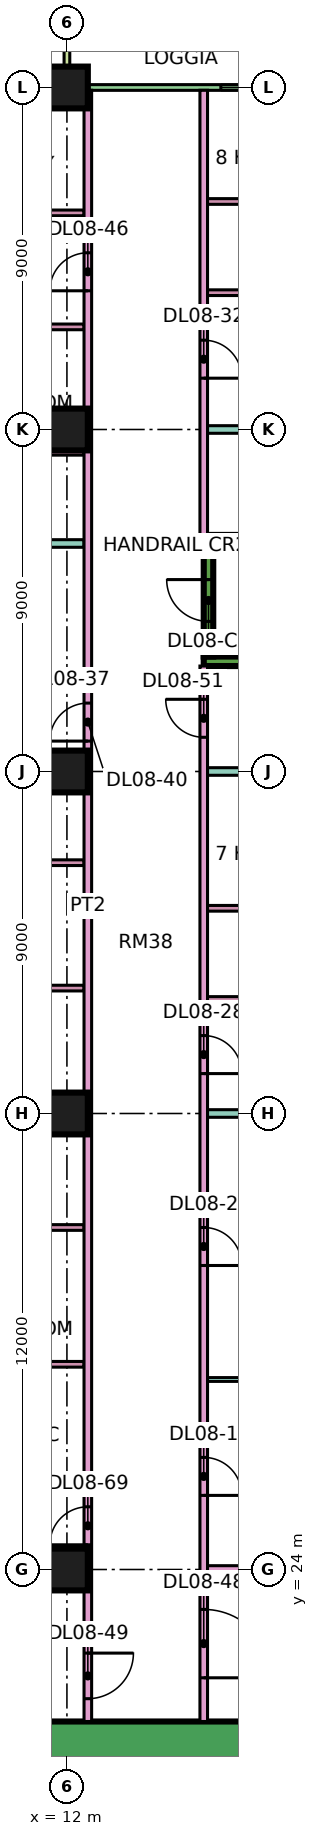
"""IFC4 building model, lengths in metres.
Left out: names, types, materials, properties, quantities, classifications, styles, units other than length and angle.
Written with IfcOpenShell. Run it as: python <this file> out.ifc"""

import sys

from ifc_helpers import new_model, si_unit, direction, frame, frame_2d, origin, origin_2d, place, context, subcontext, project, spatial, rectangle, extrude, element, fill, save


model = new_model("IFC4")
c1 = context("Model", 3, precision=1e-05, world=origin(), true_north=direction((0.0, 1.0)))
c2 = subcontext(c1, "Body", "Model", "MODEL_VIEW")
j1 = project(units=[si_unit("LENGTHUNIT", "METRE"), si_unit("PLANEANGLEUNIT", "RADIAN")], contexts=[c1])
p1 = place(None, origin())
s1 = spatial("IfcSite", under=j1, at=p1, CompositionType="ELEMENT")
p2 = place(p1, origin())
s2 = spatial("IfcBuilding", under=s1, at=p2, CompositionType="ELEMENT")
p3 = place(p2, frame((0.0, 0.0, 45.15)))
s3 = spatial("IfcBuildingStorey", under=s2, at=p3, CompositionType="ELEMENT", Elevation=45.15)
for number, where, z_axis, x_axis in (
    (1, (12.0, 24.0, 0.0), (0.0, 0.0, 1.0), (1.0, 0.0, 0.0)),
    (2, (12.0, 36.0, 0.0), (0.0, 0.0, 1.0), (1.0, 0.0, 0.0)),
    (3, (12.0, 45.0, 0.0), (0.0, 0.0, 1.0), (1.0, 0.0, 0.0)),
    (4, (12.0, 54.0, 0.0), (0.0, 0.0, 1.0), (1.0, 0.0, 0.0)),
    (5, (12.0, 63.0, 0.0), (0.0, 0.0, 1.0), (1.0, 0.0, 0.0)),
):
    element("IfcColumn", number, at=place(p3, frame(where, z_axis=z_axis, x_axis=x_axis)), inside=s3, PredefinedType="COLUMN", context=c2, shape_type="SweptSolid", body=[
        extrude(rectangle(XDim=1.1, YDim=1.1, at=origin_2d()), origin(), (0.0, 0.0, 1.0), 3.75),
    ])
p4 = place(p3, frame((9.0, 19.45, 0.0), z_axis=(0.0, 0.0, 1.0), x_axis=(1.0, 0.0, 0.0)))
e6 = element("IfcWall", 6, at=p4, inside=s3, PredefinedType="SHEAR", context=c2, shape_type="SweptSolid", body=[
    extrude(rectangle(XDim=25.0, YDim=1.1, at=frame_2d((12.5, 0.0))), origin(), (0.0, 0.0, 1.0), 3.75),
])
p5 = place(p4, frame((19.1, 0.0, 0.0)))
e7 = element("IfcOpeningElement", 7, at=p5, cuts=e6, PredefinedType="OPENING", context=c2, shape_type="SweptSolid", body=[
    extrude(rectangle(XDim=1.8, YDim=2.4, at=frame_2d((0.9, 1.2))), frame((0.0, 0.56, 0.0), z_axis=(0.0, -1.0, 0.0), x_axis=(1.0, 0.0, 0.0)), (0.0, 0.0, 1.0), 1.12),
])
for number, where, z_axis, x_axis in (
    (8, (15.6, 47.9, 0.0), (0.0, 0.0, 1.0), (1.0, 0.0, 0.0)),
    (9, (15.6, 51.1, 0.0), (0.0, 0.0, 1.0), (1.0, 0.0, 0.0)),
):
    element("IfcWall", number, at=place(p3, frame(where, z_axis=z_axis, x_axis=x_axis)), inside=s3, PredefinedType="SHEAR", context=c2, shape_type="SweptSolid", body=[
        extrude(rectangle(XDim=7.0, YDim=0.25, at=frame_2d((3.5, 0.0))), origin(), (0.0, 0.0, 1.0), 3.75),
    ])
p6 = place(p3, frame((15.725, 48.025, 0.0), z_axis=(0.0, 0.0, 1.0), x_axis=(0.0, 1.0, 0.0)))
e10 = element("IfcWall", 10, at=p6, inside=s3, PredefinedType="SHEAR", context=c2, shape_type="SweptSolid", body=[
    extrude(rectangle(XDim=2.95, YDim=0.25, at=frame_2d((1.475, 0.0))), origin(), (0.0, 0.0, 1.0), 3.75),
])
p7 = place(p6, frame((0.925, 0.0, 0.0)))
e11 = element("IfcOpeningElement", 11, at=p7, cuts=e10, PredefinedType="OPENING", context=c2, shape_type="SweptSolid", body=[
    extrude(rectangle(XDim=1.1, YDim=2.2, at=frame_2d((0.55, 1.1))), frame((0.0, 0.135, 0.0), z_axis=(0.0, -1.0, 0.0), x_axis=(1.0, 0.0, 0.0)), (0.0, 0.0, 1.0), 0.27),
])
p8 = place(p3, frame((22.425, 63.0, 0.0), z_axis=(0.0, 0.0, 1.0), x_axis=(-1.0, 0.0, 0.0)))
e12 = element("IfcWall", 12, at=p8, inside=s3, PredefinedType="SOLIDWALL", context=c2, shape_type="SweptSolid", body=[
    extrude(rectangle(XDim=10.35, YDim=0.15, at=frame_2d((5.175, 0.0))), origin(), (0.0, 0.0, 1.0), 3.35),
])
p9 = place(p8, frame((0.562, 0.0, 0.45)))
e13 = element("IfcOpeningElement", 13, at=p9, cuts=e12, PredefinedType="OPENING", context=c2, shape_type="SweptSolid", body=[
    extrude(rectangle(XDim=1.2, YDim=2.4, at=frame_2d((0.6, 1.2))), frame((0.0, 0.085, 0.0), z_axis=(0.0, -1.0, 0.0), x_axis=(1.0, 0.0, 0.0)), (0.0, 0.0, 1.0), 0.17),
])
p10 = place(p8, frame((3.975, 0.0, 0.45)))
e14 = element("IfcOpeningElement", 14, at=p10, cuts=e12, PredefinedType="OPENING", context=c2, shape_type="SweptSolid", body=[
    extrude(rectangle(XDim=2.4, YDim=2.4, at=frame_2d((1.2, 1.2))), frame((0.0, 0.085, 0.0), z_axis=(0.0, -1.0, 0.0), x_axis=(1.0, 0.0, 0.0)), (0.0, 0.0, 1.0), 0.17),
])
p11 = place(p3, frame((12.0, 64.5, 0.0), z_axis=(0.0, 0.0, 1.0), x_axis=(0.0, -1.0, 0.0)))
e15 = element("IfcWall", 15, at=p11, inside=s3, PredefinedType="SOLIDWALL", context=c2, shape_type="SweptSolid", body=[
    extrude(rectangle(XDim=1.5, YDim=0.15, at=frame_2d((0.75, 0.0))), origin(), (0.0, 0.0, 1.0), 3.35),
])
p12 = place(p3, frame((0.0, 36.0, 0.0), z_axis=(0.0, 0.0, 1.0), x_axis=(1.0, 0.0, 0.0)))
e16 = element("IfcWall", 16, at=p12, inside=s3, PredefinedType="PARTITIONING", context=c2, shape_type="SweptSolid", body=[
    extrude(rectangle(XDim=12.45, YDim=0.2, at=frame_2d((6.225, 0.0))), origin(), (0.0, 0.0, 1.0), 3.35),
])
p13 = place(p3, frame((-1.35, 51.0, 0.0), z_axis=(0.0, 0.0, 1.0), x_axis=(1.0, 0.0, 0.0)))
e17 = element("IfcWall", 17, at=p13, inside=s3, PredefinedType="PARTITIONING", context=c2, shape_type="SweptSolid", body=[
    extrude(rectangle(XDim=13.8, YDim=0.2, at=frame_2d((6.9, 0.0))), origin(), (0.0, 0.0, 1.0), 3.35),
])
p14 = place(p3, frame((0.074, 22.4, 0.0), z_axis=(0.0, 0.0, 1.0), x_axis=(1.0, 0.0, 0.0)))
e18 = element("IfcWall", 18, at=p14, inside=s3, PredefinedType="PARTITIONING", context=c2, shape_type="SweptSolid", body=[
    extrude(rectangle(XDim=12.376, YDim=0.2, at=frame_2d((6.188, 0.0))), origin(), (0.0, 0.0, 1.0), 3.35),
])
p15 = place(p3, frame((7.1, 47.4, 0.0), z_axis=(0.0, 0.0, 1.0), x_axis=(1.0, 0.0, 0.0)))
e19 = element("IfcWall", 19, at=p15, inside=s3, PredefinedType="PARTITIONING", context=c2, shape_type="SweptSolid", body=[
    extrude(rectangle(XDim=5.35, YDim=0.1, at=frame_2d((2.675, 0.0))), origin(), (0.0, 0.0, 1.0), 3.35),
])
p16 = place(p15, frame((2.3, 0.0, 0.0)))
e20 = element("IfcOpeningElement", 20, at=p16, cuts=e19, PredefinedType="OPENING", context=c2, shape_type="SweptSolid", body=[
    extrude(rectangle(XDim=0.9, YDim=2.1, at=frame_2d((0.45, 1.05))), frame((0.0, 0.06, 0.0), z_axis=(0.0, -1.0, 0.0), x_axis=(1.0, 0.0, 0.0)), (0.0, 0.0, 1.0), 0.12),
])
for number, where, z_axis, x_axis in (
    (21, (7.225, 39.3, 0.0), (0.0, 0.0, 1.0), (1.0, 0.0, 0.0)),
    (22, (7.225, 42.6, 0.0), (0.0, 0.0, 1.0), (1.0, 0.0, 0.0)),
    (23, (7.225, 45.3, 0.0), (0.0, 0.0, 1.0), (1.0, 0.0, 0.0)),
):
    element("IfcWall", number, at=place(p3, frame(where, z_axis=z_axis, x_axis=x_axis)), inside=s3, PredefinedType="PARTITIONING", context=c2, shape_type="SweptSolid", body=[
        extrude(rectangle(XDim=5.225, YDim=0.15, at=frame_2d((2.612, 0.0))), origin(), (0.0, 0.0, 1.0), 3.35),
    ])
p17 = place(p3, frame((8.275, 59.7, 0.0), z_axis=(0.0, 0.0, 1.0), x_axis=(1.0, 0.0, 0.0)))
e24 = element("IfcWall", 24, at=p17, inside=s3, PredefinedType="PARTITIONING", context=c2, shape_type="SweptSolid", body=[
    extrude(rectangle(XDim=4.175, YDim=0.15, at=frame_2d((2.087, 0.0))), origin(), (0.0, 0.0, 1.0), 3.35),
])
for number, where, z_axis, x_axis in (
    (25, (8.425, 26.4, 0.0), (0.0, 0.0, 1.0), (1.0, 0.0, 0.0)),
    (26, (8.425, 29.4, 0.0), (0.0, 0.0, 1.0), (1.0, 0.0, 0.0)),
    (27, (8.425, 33.0, 0.0), (0.0, 0.0, 1.0), (1.0, 0.0, 0.0)),
    (28, (8.425, 53.4, 0.0), (0.0, 0.0, 1.0), (1.0, 0.0, 0.0)),
):
    element("IfcWall", number, at=place(p3, frame(where, z_axis=z_axis, x_axis=x_axis)), inside=s3, PredefinedType="PARTITIONING", context=c2, shape_type="SweptSolid", body=[
        extrude(rectangle(XDim=4.025, YDim=0.15, at=frame_2d((2.012, 0.0))), origin(), (0.0, 0.0, 1.0), 3.35),
    ])
p18 = place(p3, frame((8.425, 56.7, 0.0), z_axis=(0.0, 0.0, 1.0), x_axis=(1.0, 0.0, 0.0)))
e29 = element("IfcWall", 29, at=p18, inside=s3, PredefinedType="PARTITIONING", context=c2, shape_type="SweptSolid", body=[
    extrude(rectangle(XDim=4.025, YDim=0.15, at=frame_2d((2.012, 0.0))), origin(), (0.0, 0.0, 1.0), 3.35),
])
p19 = place(p18, frame((1.575, 0.0, 0.0)))
e30 = element("IfcOpeningElement", 30, at=p19, cuts=e29, PredefinedType="OPENING", context=c2, shape_type="SweptSolid", body=[
    extrude(rectangle(XDim=0.8, YDim=2.1, at=frame_2d((0.4, 1.05))), frame((0.0, 0.085, 0.0), z_axis=(0.0, -1.0, 0.0), x_axis=(1.0, 0.0, 0.0)), (0.0, 0.0, 1.0), 0.17),
])
p20 = place(p3, frame((12.55, 20.0, 0.0), z_axis=(0.0, 0.0, 1.0), x_axis=(0.0, 1.0, 0.0)))
e31 = element("IfcWall", 31, at=p20, inside=s3, PredefinedType="PARTITIONING", context=c2, shape_type="SweptSolid", body=[
    extrude(rectangle(XDim=42.926, YDim=0.2, at=frame_2d((21.463, 0.0))), origin(), (0.0, 0.0, 1.0), 3.35),
])
p21 = place(p20, frame((25.8, 0.0, 0.0)))
e32 = element("IfcOpeningElement", 32, at=p21, cuts=e31, PredefinedType="OPENING", context=c2, shape_type="SweptSolid", body=[
    extrude(rectangle(XDim=1.0, YDim=2.1, at=frame_2d((0.5, 1.05))), frame((0.0, 0.11, 0.0), z_axis=(0.0, -1.0, 0.0), x_axis=(1.0, 0.0, 0.0)), (0.0, 0.0, 1.0), 0.22),
])
p22 = place(p20, frame((37.65, 0.0, 0.0)))
e33 = element("IfcOpeningElement", 33, at=p22, cuts=e31, PredefinedType="OPENING", context=c2, shape_type="SweptSolid", body=[
    extrude(rectangle(XDim=1.0, YDim=2.1, at=frame_2d((0.5, 1.05))), frame((0.0, 0.11, 0.0), z_axis=(0.0, -1.0, 0.0), x_axis=(1.0, 0.0, 0.0)), (0.0, 0.0, 1.0), 0.22),
])
p23 = place(p20, frame((0.6, 0.0, 0.0)))
e34 = element("IfcOpeningElement", 34, at=p23, cuts=e31, PredefinedType="OPENING", context=c2, shape_type="SweptSolid", body=[
    extrude(rectangle(XDim=1.2, YDim=2.1, at=frame_2d((0.6, 1.05))), frame((0.0, 0.11, 0.0), z_axis=(0.0, -1.0, 0.0), x_axis=(1.0, 0.0, 0.0)), (0.0, 0.0, 1.0), 0.22),
])
p24 = place(p20, frame((4.65, 0.0, 0.0)))
e35 = element("IfcOpeningElement", 35, at=p24, cuts=e31, PredefinedType="OPENING", context=c2, shape_type="SweptSolid", body=[
    extrude(rectangle(XDim=1.0, YDim=2.1, at=frame_2d((0.5, 1.05))), frame((0.0, 0.11, 0.0), z_axis=(0.0, -1.0, 0.0), x_axis=(1.0, 0.0, 0.0)), (0.0, 0.0, 1.0), 0.22),
])
p25 = place(p3, frame((15.6, 20.0, 0.0), z_axis=(0.0, 0.0, 1.0), x_axis=(0.0, 1.0, 0.0)))
e36 = element("IfcWall", 36, at=p25, inside=s3, PredefinedType="PARTITIONING", context=c2, shape_type="SweptSolid", body=[
    extrude(rectangle(XDim=27.775, YDim=0.2, at=frame_2d((13.887, 0.0))), origin(), (0.0, 0.0, 1.0), 3.35),
])
p26 = place(p25, frame((5.95, 0.0, 0.0)))
e37 = element("IfcOpeningElement", 37, at=p26, cuts=e36, PredefinedType="OPENING", context=c2, shape_type="SweptSolid", body=[
    extrude(rectangle(XDim=1.0, YDim=2.1, at=frame_2d((0.5, 1.05))), frame((0.0, 0.11, 0.0), z_axis=(0.0, -1.0, 0.0), x_axis=(1.0, 0.0, 0.0)), (0.0, 0.0, 1.0), 0.22),
])
p27 = place(p25, frame((12.0, 0.0, 0.0)))
e38 = element("IfcOpeningElement", 38, at=p27, cuts=e36, PredefinedType="OPENING", context=c2, shape_type="SweptSolid", body=[
    extrude(rectangle(XDim=1.0, YDim=2.1, at=frame_2d((0.5, 1.05))), frame((0.0, 0.11, 0.0), z_axis=(0.0, -1.0, 0.0), x_axis=(1.0, 0.0, 0.0)), (0.0, 0.0, 1.0), 0.22),
])
p28 = place(p25, frame((17.05, 0.0, 0.0)))
e39 = element("IfcOpeningElement", 39, at=p28, cuts=e36, PredefinedType="OPENING", context=c2, shape_type="SweptSolid", body=[
    extrude(rectangle(XDim=1.0, YDim=2.1, at=frame_2d((0.5, 1.05))), frame((0.0, 0.11, 0.0), z_axis=(0.0, -1.0, 0.0), x_axis=(1.0, 0.0, 0.0)), (0.0, 0.0, 1.0), 0.22),
])
p29 = place(p25, frame((1.15, 0.0, 0.0)))
e40 = element("IfcOpeningElement", 40, at=p29, cuts=e36, PredefinedType="OPENING", context=c2, shape_type="SweptSolid", body=[
    extrude(rectangle(XDim=1.8, YDim=2.1, at=frame_2d((0.9, 1.05))), frame((0.0, 0.11, 0.0), z_axis=(0.0, -1.0, 0.0), x_axis=(1.0, 0.0, 0.0)), (0.0, 0.0, 1.0), 0.22),
])
p30 = place(p25, frame((25.9, 0.0, 0.0)))
e41 = element("IfcOpeningElement", 41, at=p30, cuts=e36, PredefinedType="OPENING", context=c2, shape_type="SweptSolid", body=[
    extrude(rectangle(XDim=1.0, YDim=2.1, at=frame_2d((0.5, 1.05))), frame((0.0, 0.11, 0.0), z_axis=(0.0, -1.0, 0.0), x_axis=(1.0, 0.0, 0.0)), (0.0, 0.0, 1.0), 0.22),
])
p31 = place(p3, frame((15.6, 51.225, 0.0), z_axis=(0.0, 0.0, 1.0), x_axis=(0.0, 1.0, 0.0)))
e42 = element("IfcWall", 42, at=p31, inside=s3, PredefinedType="PARTITIONING", context=c2, shape_type="SweptSolid", body=[
    extrude(rectangle(XDim=11.701, YDim=0.2, at=frame_2d((5.851, 0.0))), origin(), (0.0, 0.0, 1.0), 3.35),
])
p32 = place(p31, frame((4.125, 0.0, 0.0)))
e43 = element("IfcOpeningElement", 43, at=p32, cuts=e42, PredefinedType="OPENING", context=c2, shape_type="SweptSolid", body=[
    extrude(rectangle(XDim=1.0, YDim=2.1, at=frame_2d((0.5, 1.05))), frame((0.0, 0.11, 0.0), z_axis=(0.0, -1.0, 0.0), x_axis=(1.0, 0.0, 0.0)), (0.0, 0.0, 1.0), 0.22),
])
p33 = place(p3, frame((15.7, 24.0, 0.0), z_axis=(0.0, 0.0, 1.0), x_axis=(1.0, 0.0, 0.0)))
e44 = element("IfcWall", 44, at=p33, inside=s3, PredefinedType="PARTITIONING", context=c2, shape_type="SweptSolid", body=[
    extrude(rectangle(XDim=5.8, YDim=0.2, at=frame_2d((2.9, 0.0))), origin(), (0.0, 0.0, 1.0), 3.35),
])
p34 = place(p3, frame((15.7, 29.0, 0.0), z_axis=(0.0, 0.0, 1.0), x_axis=(1.0, 0.0, 0.0)))
e45 = element("IfcWall", 45, at=p34, inside=s3, PredefinedType="PARTITIONING", context=c2, shape_type="SweptSolid", body=[
    extrude(rectangle(XDim=5.8, YDim=0.1, at=frame_2d((2.9, 0.0))), origin(), (0.0, 0.0, 1.0), 3.35),
])
p35 = place(p3, frame((15.7, 36.0, 0.0), z_axis=(0.0, 0.0, 1.0), x_axis=(1.0, 0.0, 0.0)))
e46 = element("IfcWall", 46, at=p35, inside=s3, PredefinedType="PARTITIONING", context=c2, shape_type="SweptSolid", body=[
    extrude(rectangle(XDim=8.3, YDim=0.2, at=frame_2d((4.15, 0.0))), origin(), (0.0, 0.0, 1.0), 3.35),
])
for number, where, z_axis, x_axis in (
    (47, (15.7, 39.0, 0.0), (0.0, 0.0, 1.0), (1.0, 0.0, 0.0)),
    (48, (15.7, 41.4, 0.0), (0.0, 0.0, 1.0), (1.0, 0.0, 0.0)),
):
    element("IfcWall", number, at=place(p3, frame(where, z_axis=z_axis, x_axis=x_axis)), inside=s3, PredefinedType="PARTITIONING", context=c2, shape_type="SweptSolid", body=[
        extrude(rectangle(XDim=3.125, YDim=0.15, at=frame_2d((1.562, 0.0))), origin(), (0.0, 0.0, 1.0), 3.35),
    ])
p36 = place(p3, frame((15.7, 45.0, 0.0), z_axis=(0.0, 0.0, 1.0), x_axis=(1.0, 0.0, 0.0)))
e49 = element("IfcWall", 49, at=p36, inside=s3, PredefinedType="PARTITIONING", context=c2, shape_type="SweptSolid", body=[
    extrude(rectangle(XDim=8.226, YDim=0.2, at=frame_2d((4.113, 0.0))), origin(), (0.0, 0.0, 1.0), 3.35),
])
p37 = place(p3, frame((15.7, 54.0, 0.0), z_axis=(0.0, 0.0, 1.0), x_axis=(1.0, 0.0, 0.0)))
e50 = element("IfcWall", 50, at=p37, inside=s3, PredefinedType="PARTITIONING", context=c2, shape_type="SweptSolid", body=[
    extrude(rectangle(XDim=8.3, YDim=0.2, at=frame_2d((4.15, 0.0))), origin(), (0.0, 0.0, 1.0), 3.35),
])
for number, where, z_axis, x_axis in (
    (51, (15.7, 57.6, 0.0), (0.0, 0.0, 1.0), (1.0, 0.0, 0.0)),
    (52, (15.7, 60.0, 0.0), (0.0, 0.0, 1.0), (1.0, 0.0, 0.0)),
):
    element("IfcWall", number, at=place(p3, frame(where, z_axis=z_axis, x_axis=x_axis)), inside=s3, PredefinedType="PARTITIONING", context=c2, shape_type="SweptSolid", body=[
        extrude(rectangle(XDim=3.125, YDim=0.15, at=frame_2d((1.562, 0.0))), origin(), (0.0, 0.0, 1.0), 3.35),
    ])
p38 = place(p10, origin())
e53 = element("IfcWindow", 53, at=p38, inside=s3, PartitioningType="SINGLE_PANEL", PredefinedType="WINDOW", context=c2, shape_type="SweptSolid", body=[
    extrude(rectangle(XDim=2.4, YDim=2.4, at=frame_2d((1.2, 1.2))), frame((0.0, 0.03, 0.0), z_axis=(0.0, -1.0, 0.0), x_axis=(1.0, 0.0, 0.0)), (0.0, 0.0, 1.0), 0.06),
])
fill(e14, e53)
p39 = place(p7, frame((1.1, 0.0, 0.0), z_axis=(0.0, 0.0, 1.0), x_axis=(-1.0, 0.0, 0.0)))
e54 = element("IfcDoor", 54, at=p39, inside=s3, OperationType="SINGLE_SWING_RIGHT", PredefinedType="DOOR", context=c2, shape_type="SweptSolid", body=[
    extrude(rectangle(XDim=1.1, YDim=2.2, at=frame_2d((0.55, 1.1))), frame((0.0, 0.025, 0.0), z_axis=(0.0, -1.0, 0.0), x_axis=(1.0, 0.0, 0.0)), (0.0, 0.0, 1.0), 0.05),
])
fill(e11, e54)
p40 = place(p26, frame((1.0, 0.0, 0.0), z_axis=(0.0, 0.0, 1.0), x_axis=(-1.0, 0.0, 0.0)))
e55 = element("IfcDoor", 55, at=p40, inside=s3, OperationType="SINGLE_SWING_LEFT", PredefinedType="DOOR", context=c2, shape_type="SweptSolid", body=[
    extrude(rectangle(XDim=1.0, YDim=2.1, at=frame_2d((0.5, 1.05))), frame((0.0, 0.025, 0.0), z_axis=(0.0, -1.0, 0.0), x_axis=(1.0, 0.0, 0.0)), (0.0, 0.0, 1.0), 0.05),
])
fill(e37, e55)
p41 = place(p27, frame((1.0, 0.0, 0.0), z_axis=(0.0, 0.0, 1.0), x_axis=(-1.0, 0.0, 0.0)))
e56 = element("IfcDoor", 56, at=p41, inside=s3, OperationType="SINGLE_SWING_LEFT", PredefinedType="DOOR", context=c2, shape_type="SweptSolid", body=[
    extrude(rectangle(XDim=1.0, YDim=2.1, at=frame_2d((0.5, 1.05))), frame((0.0, 0.025, 0.0), z_axis=(0.0, -1.0, 0.0), x_axis=(1.0, 0.0, 0.0)), (0.0, 0.0, 1.0), 0.05),
])
fill(e38, e56)
p42 = place(p28, frame((1.0, 0.0, 0.0), z_axis=(0.0, 0.0, 1.0), x_axis=(-1.0, 0.0, 0.0)))
e57 = element("IfcDoor", 57, at=p42, inside=s3, OperationType="SINGLE_SWING_LEFT", PredefinedType="DOOR", context=c2, shape_type="SweptSolid", body=[
    extrude(rectangle(XDim=1.0, YDim=2.1, at=frame_2d((0.5, 1.05))), frame((0.0, 0.025, 0.0), z_axis=(0.0, -1.0, 0.0), x_axis=(1.0, 0.0, 0.0)), (0.0, 0.0, 1.0), 0.05),
])
fill(e39, e57)
p43 = place(p32, frame((1.0, 0.0, 0.0), z_axis=(0.0, 0.0, 1.0), x_axis=(-1.0, 0.0, 0.0)))
e58 = element("IfcDoor", 58, at=p43, inside=s3, OperationType="SINGLE_SWING_LEFT", PredefinedType="DOOR", context=c2, shape_type="SweptSolid", body=[
    extrude(rectangle(XDim=1.0, YDim=2.1, at=frame_2d((0.5, 1.05))), frame((0.0, 0.025, 0.0), z_axis=(0.0, -1.0, 0.0), x_axis=(1.0, 0.0, 0.0)), (0.0, 0.0, 1.0), 0.05),
])
fill(e43, e58)
p44 = place(p21, origin())
e59 = element("IfcDoor", 59, at=p44, inside=s3, OperationType="SINGLE_SWING_LEFT", PredefinedType="DOOR", context=c2, shape_type="SweptSolid", body=[
    extrude(rectangle(XDim=1.0, YDim=2.1, at=frame_2d((0.5, 1.05))), frame((0.0, 0.025, 0.0), z_axis=(0.0, -1.0, 0.0), x_axis=(1.0, 0.0, 0.0)), (0.0, 0.0, 1.0), 0.05),
])
fill(e32, e59)
p45 = place(p22, origin())
e60 = element("IfcDoor", 60, at=p45, inside=s3, OperationType="SINGLE_SWING_LEFT", PredefinedType="DOOR", context=c2, shape_type="SweptSolid", body=[
    extrude(rectangle(XDim=1.0, YDim=2.1, at=frame_2d((0.5, 1.05))), frame((0.0, 0.025, 0.0), z_axis=(0.0, -1.0, 0.0), x_axis=(1.0, 0.0, 0.0)), (0.0, 0.0, 1.0), 0.05),
])
fill(e33, e60)
p46 = place(p29, frame((1.8, 0.0, 0.0), z_axis=(0.0, 0.0, 1.0), x_axis=(-1.0, 0.0, 0.0)))
e61 = element("IfcDoor", 61, at=p46, inside=s3, OperationType="DOUBLE_DOOR_SINGLE_SWING", PredefinedType="DOOR", context=c2, shape_type="SweptSolid", body=[
    extrude(rectangle(XDim=1.8, YDim=2.1, at=frame_2d((0.9, 1.05))), frame((0.0, 0.025, 0.0), z_axis=(0.0, -1.0, 0.0), x_axis=(1.0, 0.0, 0.0)), (0.0, 0.0, 1.0), 0.05),
])
fill(e40, e61)
p47 = place(p23, origin())
e62 = element("IfcDoor", 62, at=p47, inside=s3, OperationType="SINGLE_SWING_RIGHT", PredefinedType="DOOR", context=c2, shape_type="SweptSolid", body=[
    extrude(rectangle(XDim=1.2, YDim=2.1, at=frame_2d((0.6, 1.05))), frame((0.0, 0.025, 0.0), z_axis=(0.0, -1.0, 0.0), x_axis=(1.0, 0.0, 0.0)), (0.0, 0.0, 1.0), 0.05),
])
fill(e34, e62)
p48 = place(p30, frame((1.0, 0.0, 0.0), z_axis=(0.0, 0.0, 1.0), x_axis=(-1.0, 0.0, 0.0)))
e63 = element("IfcDoor", 63, at=p48, inside=s3, OperationType="SINGLE_SWING_RIGHT", PredefinedType="DOOR", context=c2, shape_type="SweptSolid", body=[
    extrude(rectangle(XDim=1.0, YDim=2.1, at=frame_2d((0.5, 1.05))), frame((0.0, 0.025, 0.0), z_axis=(0.0, -1.0, 0.0), x_axis=(1.0, 0.0, 0.0)), (0.0, 0.0, 1.0), 0.05),
])
fill(e41, e63)
p49 = place(p24, origin())
e64 = element("IfcDoor", 64, at=p49, inside=s3, OperationType="SINGLE_SWING_LEFT", PredefinedType="DOOR", context=c2, shape_type="SweptSolid", body=[
    extrude(rectangle(XDim=1.0, YDim=2.1, at=frame_2d((0.5, 1.05))), frame((0.0, 0.025, 0.0), z_axis=(0.0, -1.0, 0.0), x_axis=(1.0, 0.0, 0.0)), (0.0, 0.0, 1.0), 0.05),
])
fill(e35, e64)
save(model, sys.argv[1])
